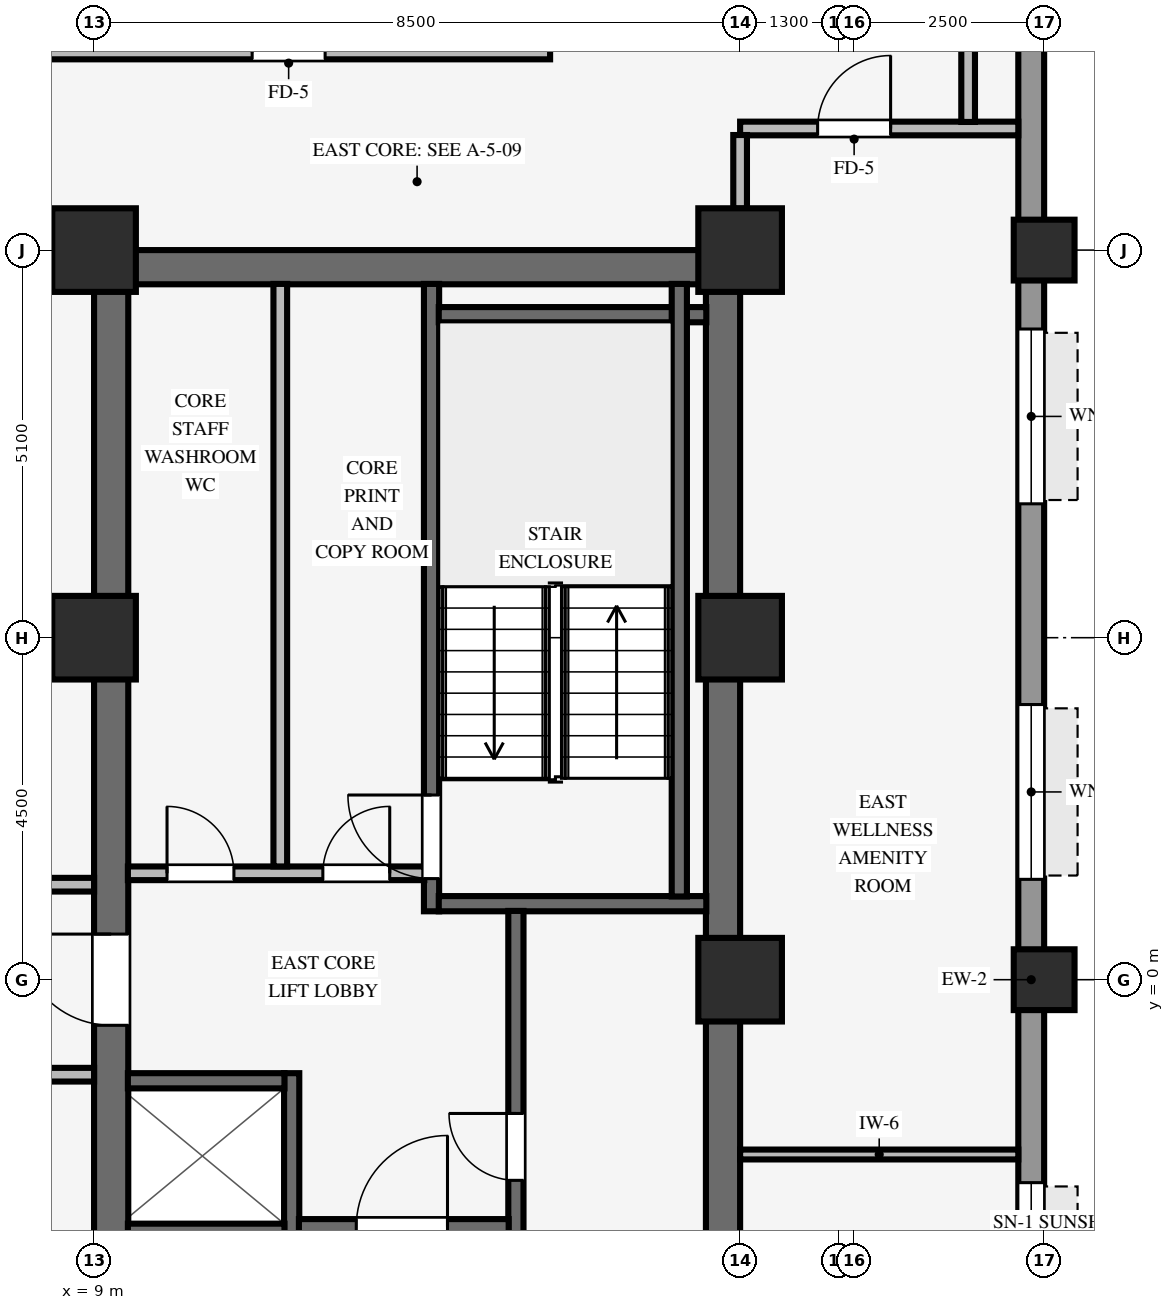
"""IFC4 building model, lengths in metres.
Left out: names, types, materials, properties, quantities, classifications, styles, units other than length and angle.
Written with IfcOpenShell. Run it as: python <this file> out.ifc"""

import sys

from ifc_helpers import new_model, si_unit, direction, frame, frame_2d, origin, origin_2d, place, context, subcontext, project, spatial, rectangle, hollow_rectangle, extrude, source, transform, mapped, element, fill, save


model = new_model("IFC4")
c1 = context("Model", 3, precision=1e-05, world=origin(), true_north=direction((0.0, 1.0)))
c2 = subcontext(c1, "Body", "Model", "MODEL_VIEW")
j1 = project(units=[si_unit("LENGTHUNIT", "METRE"), si_unit("PLANEANGLEUNIT", "RADIAN")], contexts=[c1])
p1 = place(None, origin())
s1 = spatial("IfcSite", under=j1, at=p1, CompositionType="ELEMENT")
p2 = place(p1, origin())
s2 = spatial("IfcBuilding", under=s1, at=p2, CompositionType="ELEMENT")
p3 = place(p2, frame((0.0, 0.0, 78.7)))
s3 = spatial("IfcBuildingStorey", under=s2, at=p3, CompositionType="ELEMENT", Elevation=78.7)
p4 = place(p3, frame((9.0, 9.375, 0.0), z_axis=(0.0, 0.0, 1.0), x_axis=(1.0, 0.0, 0.0)))
e1 = element("IfcWall", 1, at=p4, inside=s3, PredefinedType="SHEAR", context=c2, shape_type="SweptSolid", body=[
    extrude(rectangle(XDim=8.5, YDim=0.45, at=frame_2d((4.25, 0.0))), origin(), (0.0, 0.0, 1.0), 3.37),
])
p5 = place(p3, frame((9.225, -9.155, 0.0), z_axis=(0.0, 0.0, 1.0), x_axis=(0.0, 1.0, 0.0)))
e2 = element("IfcWall", 2, at=p5, inside=s3, PredefinedType="SHEAR", context=c2, shape_type="SweptSolid", body=[
    extrude(rectangle(XDim=18.31, YDim=0.45, at=frame_2d((9.155, 0.0))), origin(), (0.0, 0.0, 1.0), 3.37),
])
p6 = place(p5, frame((8.555, 0.0, 0.0)))
e3 = element("IfcOpeningElement", 3, at=p6, cuts=e2, PredefinedType="OPENING", context=c2, shape_type="SweptSolid", body=[
    extrude(rectangle(XDim=1.2, YDim=2.15, at=frame_2d((0.6, 1.075))), frame((0.0, 0.235, 0.0), z_axis=(0.0, -1.0, 0.0), x_axis=(1.0, 0.0, 0.0)), (0.0, 0.0, 1.0), 0.47),
])
p7 = place(p3, frame((17.275, -9.155, 0.0), z_axis=(0.0, 0.0, 1.0), x_axis=(0.0, 1.0, 0.0)))
e4 = element("IfcWall", 4, at=p7, inside=s3, PredefinedType="SHEAR", context=c2, shape_type="SweptSolid", body=[
    extrude(rectangle(XDim=18.31, YDim=0.45, at=frame_2d((9.155, 0.0))), origin(), (0.0, 0.0, 1.0), 3.37),
])
for number, where, z_axis, x_axis in (
    (5, (9.0, 4.5, 0.0), (0.0, 0.0, 1.0), (1.0, 0.0, 0.0)),
    (6, (9.0, 9.6, 0.0), (0.0, 0.0, 1.0), (1.0, 0.0, 0.0)),
    (7, (17.5, 4.5, 0.0), (0.0, 0.0, 1.0), (1.0, 0.0, 0.0)),
    (8, (17.5, 9.6, 0.0), (0.0, 0.0, 1.0), (1.0, 0.0, 0.0)),
    (9, (17.5, 0.0, 0.0), (0.0, 0.0, 1.0), (1.0, 0.0, 0.0)),
):
    element("IfcColumn", number, at=place(p3, frame(where, z_axis=z_axis, x_axis=x_axis)), inside=s3, PredefinedType="COLUMN", context=c2, shape_type="SweptSolid", body=[
        extrude(rectangle(XDim=1.1, YDim=1.1, at=origin_2d()), origin(), (0.0, 0.0, 1.0), 3.37),
    ])
for number, where, z_axis, x_axis in (
    (10, (21.5, 0.0, 0.0), (0.0, 0.0, 1.0), (1.0, 0.0, 0.0)),
    (11, (21.5, 9.6, 0.0), (0.0, 0.0, 1.0), (1.0, 0.0, 0.0)),
):
    element("IfcColumn", number, at=place(p3, frame(where, z_axis=z_axis, x_axis=x_axis)), inside=s3, PredefinedType="COLUMN", context=c2, shape_type="SweptSolid", body=[
        extrude(hollow_rectangle(XDim=0.8, YDim=0.8, WallThickness=0.055, InnerFilletRadius=0.055, OuterFilletRadius=0.11, at=origin_2d()), origin(), (0.0, 0.0, 1.0), 3.37),
    ])
p8 = place(p3, frame((21.33, -20.764, 0.0), z_axis=(0.0, 0.0, 1.0), x_axis=(0.0, 1.0, 0.0)))
e12 = element("IfcWall", 12, at=p8, inside=s3, PredefinedType="STANDARD", context=c2, shape_type="SweptSolid", body=[
    extrude(rectangle(XDim=41.528, YDim=0.34, at=frame_2d((20.764, 0.0))), origin(), (0.0, 0.0, 1.0), 2.705),
])
p9 = place(p8, frame((12.202, 0.0, 0.8)))
e13 = element("IfcOpeningElement", 13, at=p9, cuts=e12, PredefinedType="OPENING", context=c2, shape_type="SweptSolid", body=[
    extrude(rectangle(XDim=2.3, YDim=1.62, at=frame_2d((1.15, 0.81))), frame((0.0, 0.18, 0.0), z_axis=(0.0, -1.0, 0.0), x_axis=(1.0, 0.0, 0.0)), (0.0, 0.0, 1.0), 0.36),
])
p10 = place(p8, frame((15.793, 0.0, 0.8)))
e14 = element("IfcOpeningElement", 14, at=p10, cuts=e12, PredefinedType="OPENING", context=c2, shape_type="SweptSolid", body=[
    extrude(rectangle(XDim=2.3, YDim=1.62, at=frame_2d((1.15, 0.81))), frame((0.0, 0.18, 0.0), z_axis=(0.0, -1.0, 0.0), x_axis=(1.0, 0.0, 0.0)), (0.0, 0.0, 1.0), 0.36),
])
p11 = place(p8, frame((22.084, 0.0, 0.8)))
e15 = element("IfcOpeningElement", 15, at=p11, cuts=e12, PredefinedType="OPENING", context=c2, shape_type="SweptSolid", body=[
    extrude(rectangle(XDim=2.3, YDim=1.62, at=frame_2d((1.15, 0.81))), frame((0.0, 0.18, 0.0), z_axis=(0.0, -1.0, 0.0), x_axis=(1.0, 0.0, 0.0)), (0.0, 0.0, 1.0), 0.36),
])
p12 = place(p8, frame((27.025, 0.0, 0.8)))
e16 = element("IfcOpeningElement", 16, at=p12, cuts=e12, PredefinedType="OPENING", context=c2, shape_type="SweptSolid", body=[
    extrude(rectangle(XDim=2.3, YDim=1.62, at=frame_2d((1.15, 0.81))), frame((0.0, 0.18, 0.0), z_axis=(0.0, -1.0, 0.0), x_axis=(1.0, 0.0, 0.0)), (0.0, 0.0, 1.0), 0.36),
])
p13 = place(p3, frame((13.44, 0.9, 0.0), z_axis=(0.0, 0.0, 1.0), x_axis=(0.0, 1.0, 0.0)))
e17 = element("IfcWall", 17, at=p13, inside=s3, PredefinedType="SHEAR", context=c2, shape_type="SweptSolid", body=[
    extrude(rectangle(XDim=8.255, YDim=0.2, at=frame_2d((4.127, 0.0))), origin(), (0.0, 0.0, 1.0), 3.37),
])
p14 = place(p13, frame((0.43, 0.0, 0.0)))
e18 = element("IfcOpeningElement", 18, at=p14, cuts=e17, PredefinedType="OPENING", context=c2, shape_type="SweptSolid", body=[
    extrude(rectangle(XDim=1.1, YDim=2.15, at=frame_2d((0.55, 1.075))), frame((0.0, 0.11, 0.0), z_axis=(0.0, -1.0, 0.0), x_axis=(1.0, 0.0, 0.0)), (0.0, 0.0, 1.0), 0.22),
])
for number, where, z_axis, x_axis in (
    (19, (13.535, 1.0, 0.0), (0.0, 0.0, 1.0), (1.0, 0.0, 0.0)),
    (20, (13.535, 8.75, 0.0), (0.0, 0.0, 1.0), (1.0, 0.0, 0.0)),
):
    element("IfcWall", number, at=place(p3, frame(where, z_axis=z_axis, x_axis=x_axis)), inside=s3, PredefinedType="SHEAR", context=c2, shape_type="SweptSolid", body=[
        extrude(rectangle(XDim=3.52, YDim=0.2, at=frame_2d((1.76, 0.0))), origin(), (0.0, 0.0, 1.0), 3.37),
    ])
p15 = place(p3, frame((16.7, 1.095, 0.0), z_axis=(0.0, 0.0, 1.0), x_axis=(0.0, 1.0, 0.0)))
e21 = element("IfcWall", 21, at=p15, inside=s3, PredefinedType="SHEAR", context=c2, shape_type="SweptSolid", body=[
    extrude(rectangle(XDim=8.06, YDim=0.2, at=frame_2d((4.03, 0.0))), origin(), (0.0, 0.0, 1.0), 3.37),
])
p16 = place(p3, frame((14.55, -9.155, 0.0), z_axis=(0.0, 0.0, 1.0), x_axis=(0.0, 1.0, 0.0)))
e22 = element("IfcWall", 22, at=p16, inside=s3, PredefinedType="SHEAR", context=c2, shape_type="SweptSolid", body=[
    extrude(rectangle(XDim=10.06, YDim=0.2, at=frame_2d((5.03, 0.0))), origin(), (0.0, 0.0, 1.0), 3.37),
])
p17 = place(p16, frame((6.515, 0.0, 0.0)))
e23 = element("IfcOpeningElement", 23, at=p17, cuts=e22, PredefinedType="OPENING", context=c2, shape_type="SweptSolid", body=[
    extrude(rectangle(XDim=0.88, YDim=2.1, at=frame_2d((0.44, 1.05))), frame((0.0, 0.11, 0.0), z_axis=(0.0, -1.0, 0.0), x_axis=(1.0, 0.0, 0.0)), (0.0, 0.0, 1.0), 0.22),
])
p18 = place(p16, frame((0.88, 0.0, 0.0)))
e24 = element("IfcOpeningElement", 24, at=p18, cuts=e22, PredefinedType="OPENING", context=c2, shape_type="SweptSolid", body=[
    extrude(rectangle(XDim=1.15, YDim=2.15, at=frame_2d((0.575, 1.075))), frame((0.0, 0.11, 0.0), z_axis=(0.0, -1.0, 0.0), x_axis=(1.0, 0.0, 0.0)), (0.0, 0.0, 1.0), 0.22),
])
p19 = place(p3, frame((11.6, -9.155, 0.0), z_axis=(0.0, 0.0, 1.0), x_axis=(0.0, 1.0, 0.0)))
e25 = element("IfcWall", 25, at=p19, inside=s3, PredefinedType="SHEAR", context=c2, shape_type="SweptSolid", body=[
    extrude(rectangle(XDim=7.925, YDim=0.2, at=frame_2d((3.962, 0.0))), origin(), (0.0, 0.0, 1.0), 3.37),
])
p20 = place(p3, frame((11.695, -3.25, 0.0), z_axis=(0.0, 0.0, 1.0), x_axis=(1.0, 0.0, 0.0)))
e26 = element("IfcWall", 26, at=p20, inside=s3, PredefinedType="SHEAR", context=c2, shape_type="SweptSolid", body=[
    extrude(rectangle(XDim=2.76, YDim=0.2, at=frame_2d((1.38, 0.0))), origin(), (0.0, 0.0, 1.0), 3.37),
])
p21 = place(p20, frame((0.755, 0.0, 0.0)))
e27 = element("IfcOpeningElement", 27, at=p21, cuts=e26, PredefinedType="OPENING", context=c2, shape_type="SweptSolid", body=[
    extrude(rectangle(XDim=1.2, YDim=2.15, at=frame_2d((0.6, 1.075))), frame((0.0, 0.11, 0.0), z_axis=(0.0, -1.0, 0.0), x_axis=(1.0, 0.0, 0.0)), (0.0, 0.0, 1.0), 0.22),
])
for number, where, z_axis, x_axis in (
    (28, (9.445, -3.31, 0.0), (0.0, 0.0, 1.0), (1.0, 0.0, 0.0)),
    (29, (9.445, -1.33, 0.0), (0.0, 0.0, 1.0), (1.0, 0.0, 0.0)),
):
    element("IfcWall", number, at=place(p3, frame(where, z_axis=z_axis, x_axis=x_axis)), inside=s3, PredefinedType="SHEAR", context=c2, shape_type="SweptSolid", body=[
        extrude(rectangle(XDim=2.06, YDim=0.2, at=frame_2d((1.03, 0.0))), origin(), (0.0, 0.0, 1.0), 3.37),
    ])
p22 = place(p3, frame((9.445, 1.4, 0.0), z_axis=(0.0, 0.0, 1.0), x_axis=(1.0, 0.0, 0.0)))
e30 = element("IfcWall", 30, at=p22, inside=s3, PredefinedType="PARTITIONING", context=c2, shape_type="SweptSolid", body=[
    extrude(rectangle(XDim=3.9, YDim=0.18, at=frame_2d((1.95, 0.0))), origin(), (0.0, 0.0, 1.0), 3.36),
])
p23 = place(p22, frame((0.515, 0.0, 0.0)))
e31 = element("IfcOpeningElement", 31, at=p23, cuts=e30, PredefinedType="OPENING", context=c2, shape_type="SweptSolid", body=[
    extrude(rectangle(XDim=0.88, YDim=2.1, at=frame_2d((0.44, 1.05))), frame((0.0, 0.1, 0.0), z_axis=(0.0, -1.0, 0.0), x_axis=(1.0, 0.0, 0.0)), (0.0, 0.0, 1.0), 0.2),
])
p24 = place(p22, frame((2.565, 0.0, 0.0)))
e32 = element("IfcOpeningElement", 32, at=p24, cuts=e30, PredefinedType="OPENING", context=c2, shape_type="SweptSolid", body=[
    extrude(rectangle(XDim=0.88, YDim=2.1, at=frame_2d((0.44, 1.05))), frame((0.0, 0.1, 0.0), z_axis=(0.0, -1.0, 0.0), x_axis=(1.0, 0.0, 0.0)), (0.0, 0.0, 1.0), 0.2),
])
p25 = place(p3, frame((11.45, 1.49, 0.0), z_axis=(0.0, 0.0, 1.0), x_axis=(0.0, 1.0, 0.0)))
e33 = element("IfcWall", 33, at=p25, inside=s3, PredefinedType="PARTITIONING", context=c2, shape_type="SweptSolid", body=[
    extrude(rectangle(XDim=7.665, YDim=0.18, at=frame_2d((3.833, 0.0))), origin(), (0.0, 0.0, 1.0), 3.36),
])
p26 = place(p3, frame((17.5, -2.3, 0.0), z_axis=(0.0, 0.0, 1.0), x_axis=(1.0, 0.0, 0.0)))
e34 = element("IfcWall", 34, at=p26, inside=s3, PredefinedType="PARTITIONING", context=c2, shape_type="SweptSolid", body=[
    extrude(rectangle(XDim=3.66, YDim=0.13, at=frame_2d((1.83, 0.0))), origin(), (0.0, 0.0, 1.0), 3.36),
])
p27 = place(p3, frame((-0.8, -1.25, 0.0), z_axis=(0.0, 0.0, 1.0), x_axis=(1.0, 0.0, 0.0)))
e35 = element("IfcWall", 35, at=p27, inside=s3, PredefinedType="PARTITIONING", context=c2, shape_type="SweptSolid", body=[
    extrude(rectangle(XDim=9.8, YDim=0.18, at=frame_2d((4.9, 0.0))), origin(), (0.0, 0.0, 1.0), 3.36),
])
p28 = place(p27, frame((7.42, 0.0, 0.0)))
e36 = element("IfcOpeningElement", 36, at=p28, cuts=e35, PredefinedType="OPENING", context=c2, shape_type="SweptSolid", body=[
    extrude(rectangle(XDim=0.96, YDim=2.1, at=frame_2d((0.48, 1.05))), frame((0.0, 0.1, 0.0), z_axis=(0.0, -1.0, 0.0), x_axis=(1.0, 0.0, 0.0)), (0.0, 0.0, 1.0), 0.2),
])
p29 = place(p3, frame((-0.8, 1.25, 0.0), z_axis=(0.0, 0.0, 1.0), x_axis=(1.0, 0.0, 0.0)))
e37 = element("IfcWall", 37, at=p29, inside=s3, PredefinedType="PARTITIONING", context=c2, shape_type="SweptSolid", body=[
    extrude(rectangle(XDim=9.8, YDim=0.18, at=frame_2d((4.9, 0.0))), origin(), (0.0, 0.0, 1.0), 3.36),
])
p30 = place(p29, frame((6.42, 0.0, 0.0)))
e38 = element("IfcOpeningElement", 38, at=p30, cuts=e37, PredefinedType="OPENING", context=c2, shape_type="SweptSolid", body=[
    extrude(rectangle(XDim=0.96, YDim=2.1, at=frame_2d((0.48, 1.05))), frame((0.0, 0.1, 0.0), z_axis=(0.0, -1.0, 0.0), x_axis=(1.0, 0.0, 0.0)), (0.0, 0.0, 1.0), 0.2),
])
p31 = place(p3, frame((0.176, 9.6, 0.0), z_axis=(0.0, 0.0, 1.0), x_axis=(1.0, 0.0, 0.0)))
e39 = element("IfcWall", 39, at=p31, inside=s3, PredefinedType="PARTITIONING", context=c2, shape_type="SweptSolid", body=[
    extrude(rectangle(XDim=8.278, YDim=0.18, at=frame_2d((4.139, 0.0))), origin(), (0.0, 0.0, 1.0), 2.405),
])
p32 = place(p3, frame((17.5, 11.2, 0.0), z_axis=(0.0, 0.0, 1.0), x_axis=(1.0, 0.0, 0.0)))
e40 = element("IfcWall", 40, at=p32, inside=s3, PredefinedType="PARTITIONING", context=c2, shape_type="SweptSolid", body=[
    extrude(rectangle(XDim=3.66, YDim=0.18, at=frame_2d((1.83, 0.0))), origin(), (0.0, 0.0, 1.0), 3.36),
])
p33 = place(p32, frame((1.02, 0.0, 0.0)))
e41 = element("IfcOpeningElement", 41, at=p33, cuts=e40, PredefinedType="OPENING", context=c2, shape_type="SweptSolid", body=[
    extrude(rectangle(XDim=0.96, YDim=2.1, at=frame_2d((0.48, 1.05))), frame((0.0, 0.1, 0.0), z_axis=(0.0, -1.0, 0.0), x_axis=(1.0, 0.0, 0.0)), (0.0, 0.0, 1.0), 0.2),
])
p34 = place(p3, frame((-15.0, 12.2, 0.0), z_axis=(0.0, 0.0, 1.0), x_axis=(1.0, 0.0, 0.0)))
e42 = element("IfcWall", 42, at=p34, inside=s3, PredefinedType="PARTITIONING", context=c2, shape_type="SweptSolid", body=[
    extrude(rectangle(XDim=30.0, YDim=0.18, at=frame_2d((15.0, 0.0))), origin(), (0.0, 0.0, 1.0), 3.36),
])
p35 = place(p34, frame((3.1, 0.0, 0.0)))
e43 = element("IfcOpeningElement", 43, at=p35, cuts=e42, PredefinedType="OPENING", context=c2, shape_type="SweptSolid", body=[
    extrude(rectangle(XDim=0.96, YDim=2.1, at=frame_2d((0.48, 1.05))), frame((0.0, 0.1, 0.0), z_axis=(0.0, -1.0, 0.0), x_axis=(1.0, 0.0, 0.0)), (0.0, 0.0, 1.0), 0.2),
])
p36 = place(p34, frame((16.395, 0.0, 0.0)))
e44 = element("IfcOpeningElement", 44, at=p36, cuts=e42, PredefinedType="OPENING", context=c2, shape_type="SweptSolid", body=[
    extrude(rectangle(XDim=0.96, YDim=2.1, at=frame_2d((0.48, 1.05))), frame((0.0, 0.1, 0.0), z_axis=(0.0, -1.0, 0.0), x_axis=(1.0, 0.0, 0.0)), (0.0, 0.0, 1.0), 0.2),
])
p37 = place(p34, frame((21.62, 0.0, 0.0)))
e45 = element("IfcOpeningElement", 45, at=p37, cuts=e42, PredefinedType="OPENING", context=c2, shape_type="SweptSolid", body=[
    extrude(rectangle(XDim=0.96, YDim=2.1, at=frame_2d((0.48, 1.05))), frame((0.0, 0.1, 0.0), z_axis=(0.0, -1.0, 0.0), x_axis=(1.0, 0.0, 0.0)), (0.0, 0.0, 1.0), 0.2),
])
p38 = place(p34, frame((9.0, 0.0, 0.0)))
e46 = element("IfcOpeningElement", 46, at=p38, cuts=e42, PredefinedType="OPENING", context=c2, shape_type="SweptSolid", body=[
    extrude(rectangle(XDim=0.96, YDim=2.1, at=frame_2d((0.48, 1.05))), frame((0.0, 0.1, 0.0), z_axis=(0.0, -1.0, 0.0), x_axis=(1.0, 0.0, 0.0)), (0.0, 0.0, 1.0), 0.2),
])
p39 = place(p34, frame((26.08, 0.0, 0.0)))
e47 = element("IfcOpeningElement", 47, at=p39, cuts=e42, PredefinedType="OPENING", context=c2, shape_type="SweptSolid", body=[
    extrude(rectangle(XDim=0.96, YDim=2.1, at=frame_2d((0.48, 1.05))), frame((0.0, 0.1, 0.0), z_axis=(0.0, -1.0, 0.0), x_axis=(1.0, 0.0, 0.0)), (0.0, 0.0, 1.0), 0.2),
])
p40 = place(p3, frame((17.5, 10.146, 0.0), z_axis=(0.0, 0.0, 1.0), x_axis=(0.0, 1.0, 0.0)))
e48 = element("IfcWall", 48, at=p40, inside=s3, PredefinedType="PARTITIONING", context=c2, shape_type="SweptSolid", body=[
    extrude(rectangle(XDim=0.968, YDim=0.18, at=frame_2d((0.484, 0.0))), origin(), (0.0, 0.0, 1.0), 2.738),
])
p41 = place(p3, frame((20.5, 11.286, 0.0), z_axis=(0.0, 0.0, 1.0), x_axis=(0.0, 1.0, 0.0)))
e49 = element("IfcWall", 49, at=p41, inside=s3, PredefinedType="PARTITIONING", context=c2, shape_type="SweptSolid", body=[
    extrude(rectangle(XDim=2.228, YDim=0.18, at=frame_2d((1.114, 0.0))), origin(), (0.0, 0.0, 1.0), 3.36),
])
m1 = source(origin(), c2, "Body", "SweptSolid", [
    extrude(rectangle(XDim=2.3, YDim=1.62, at=frame_2d((1.15, 0.81))), frame((0.0, 0.03, 0.0), z_axis=(0.0, -1.0, 0.0), x_axis=(1.0, 0.0, 0.0)), (0.0, 0.0, 1.0), 0.06),
])
p42 = place(p10, origin())
e50 = element("IfcWindow", 50, at=p42, inside=s3, PartitioningType="SINGLE_PANEL", PredefinedType="WINDOW", context=c2, shape_type="MappedRepresentation", body=[
    mapped(m1, transform((0.0, 0.0, 0.0), scale=1.0)),
])
fill(e14, e50)
p43 = place(p11, origin())
e51 = element("IfcWindow", 51, at=p43, inside=s3, PartitioningType="SINGLE_PANEL", PredefinedType="WINDOW", context=c2, shape_type="MappedRepresentation", body=[
    mapped(m1, transform((0.0, 0.0, 0.0), scale=1.0)),
])
fill(e15, e51)
p44 = place(p12, origin())
e52 = element("IfcWindow", 52, at=p44, inside=s3, PartitioningType="SINGLE_PANEL", PredefinedType="WINDOW", context=c2, shape_type="MappedRepresentation", body=[
    mapped(m1, transform((0.0, 0.0, 0.0), scale=1.0)),
])
fill(e16, e52)
m2 = source(origin(), c2, "Body", "SweptSolid", [
    extrude(rectangle(XDim=1.1, YDim=2.15, at=frame_2d((0.55, 1.075))), frame((0.0, 0.025, 0.0), z_axis=(0.0, -1.0, 0.0), x_axis=(1.0, 0.0, 0.0)), (0.0, 0.0, 1.0), 0.05),
])
p45 = place(p14, origin())
e53 = element("IfcDoor", 53, at=p45, inside=s3, OperationType="SINGLE_SWING_RIGHT", PredefinedType="DOOR", context=c2, shape_type="MappedRepresentation", body=[
    mapped(m2, transform((0.0, 0.0, 0.0), scale=1.0)),
])
fill(e18, e53)
m3 = source(origin(), c2, "Body", "SweptSolid", [
    extrude(rectangle(XDim=0.88, YDim=2.1, at=frame_2d((0.44, 1.05))), frame((0.0, 0.025, 0.0), z_axis=(0.0, -1.0, 0.0), x_axis=(1.0, 0.0, 0.0)), (0.0, 0.0, 1.0), 0.05),
])
p46 = place(p17, origin())
e54 = element("IfcDoor", 54, at=p46, inside=s3, OperationType="SINGLE_SWING_RIGHT", PredefinedType="DOOR", context=c2, shape_type="MappedRepresentation", body=[
    mapped(m3, transform((0.0, 0.0, 0.0), scale=1.0)),
])
fill(e23, e54)
m4 = source(origin(), c2, "Body", "SweptSolid", [
    extrude(rectangle(XDim=1.2, YDim=2.15, at=frame_2d((0.6, 1.075))), frame((0.0, 0.025, 0.0), z_axis=(0.0, -1.0, 0.0), x_axis=(1.0, 0.0, 0.0)), (0.0, 0.0, 1.0), 0.05),
])
p47 = place(p21, origin())
e55 = element("IfcDoor", 55, at=p47, inside=s3, OperationType="SINGLE_SWING_RIGHT", PredefinedType="DOOR", context=c2, shape_type="MappedRepresentation", body=[
    mapped(m4, transform((0.0, 0.0, 0.0), scale=1.0)),
])
fill(e27, e55)
p48 = place(p6, origin())
e56 = element("IfcDoor", 56, at=p48, inside=s3, OperationType="SINGLE_SWING_RIGHT", PredefinedType="DOOR", context=c2, shape_type="MappedRepresentation", body=[
    mapped(m4, transform((0.0, 0.0, 0.0), scale=1.0)),
])
fill(e3, e56)
p49 = place(p23, origin())
e57 = element("IfcDoor", 57, at=p49, inside=s3, OperationType="SINGLE_SWING_LEFT", PredefinedType="DOOR", context=c2, shape_type="MappedRepresentation", body=[
    mapped(m3, transform((0.0, 0.0, 0.0), scale=1.0)),
])
fill(e31, e57)
p50 = place(p24, origin())
e58 = element("IfcDoor", 58, at=p50, inside=s3, OperationType="SINGLE_SWING_RIGHT", PredefinedType="DOOR", context=c2, shape_type="MappedRepresentation", body=[
    mapped(m3, transform((0.0, 0.0, 0.0), scale=1.0)),
])
fill(e32, e58)
m5 = source(origin(), c2, "Body", "SweptSolid", [
    extrude(rectangle(XDim=0.96, YDim=2.1, at=frame_2d((0.48, 1.05))), frame((0.0, 0.025, 0.0), z_axis=(0.0, -1.0, 0.0), x_axis=(1.0, 0.0, 0.0)), (0.0, 0.0, 1.0), 0.05),
])
p51 = place(p39, origin())
e59 = element("IfcDoor", 59, at=p51, inside=s3, OperationType="SINGLE_SWING_LEFT", PredefinedType="DOOR", context=c2, shape_type="MappedRepresentation", body=[
    mapped(m5, transform((0.0, 0.0, 0.0), scale=1.0)),
])
fill(e47, e59)
p52 = place(p33, origin())
e60 = element("IfcDoor", 60, at=p52, inside=s3, OperationType="SINGLE_SWING_RIGHT", PredefinedType="DOOR", context=c2, shape_type="MappedRepresentation", body=[
    mapped(m5, transform((0.0, 0.0, 0.0), scale=1.0)),
])
fill(e41, e60)
save(model, sys.argv[1])
